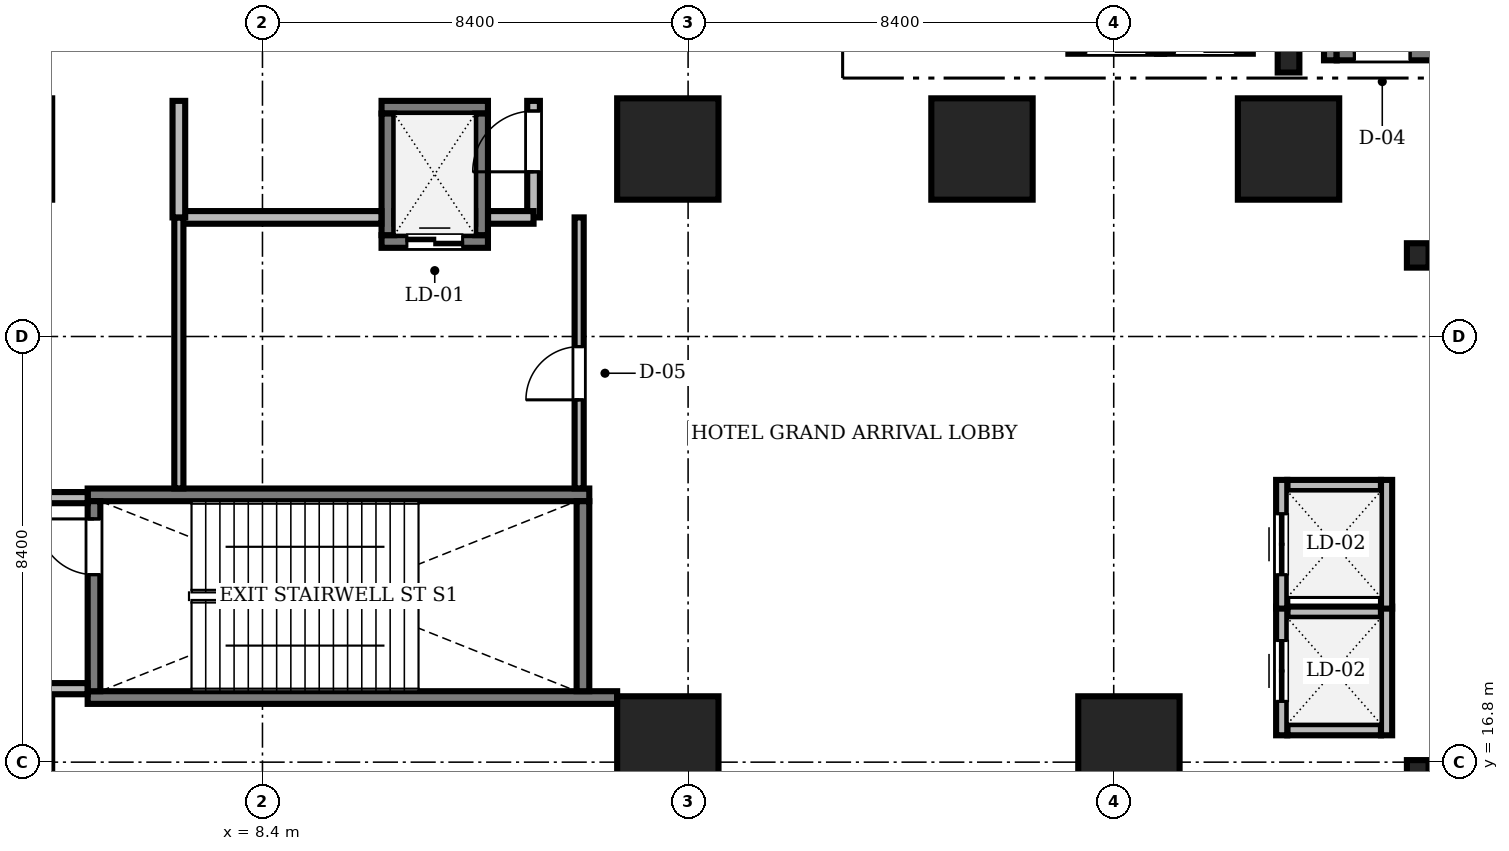
"""IFC4 building model, lengths in metres.
Left out: names, types, materials, properties, quantities, classifications, styles, units other than length and angle.
Written with IfcOpenShell. Run it as: python <this file> out.ifc"""

import sys

from ifc_helpers import new_model, si_unit, direction, frame, frame_2d, origin, origin_2d, place, context, subcontext, project, spatial, rectangle, i_section, extrude, source, transform, mapped, element, fill, save


model = new_model("IFC4")
c1 = context("Model", 3, precision=1e-05, world=origin(), true_north=direction((0.0, 1.0)))
c2 = subcontext(c1, "Body", "Model", "MODEL_VIEW")
j1 = project(units=[si_unit("LENGTHUNIT", "METRE"), si_unit("PLANEANGLEUNIT", "RADIAN")], contexts=[c1])
p1 = place(None, origin())
s1 = spatial("IfcSite", under=j1, at=p1, CompositionType="ELEMENT")
p2 = place(p1, origin())
s2 = spatial("IfcBuilding", under=s1, at=p2, CompositionType="ELEMENT")
p3 = place(p2, origin())
s3 = spatial("IfcBuildingStorey", under=s2, at=p3, CompositionType="ELEMENT", Elevation=0.0)
m1 = source(origin(), c2, "Body", "SweptSolid", [
    extrude(i_section(OverallWidth=0.428, OverallDepth=0.481, WebThickness=0.04, FlangeThickness=0.063, FilletRadius=0.015, at=origin_2d()), origin(), (0.0, 0.0, 1.0), 5.68),
])
for number, where, z_axis, x_axis in (
    (1, (31.2, 16.6, 0.0), (0.0, 0.0, 1.0), (1.0, 0.0, 0.0)),
    (2, (31.2, 26.8, 0.0), (0.0, 0.0, 1.0), (1.0, 0.0, 0.0)),
    (3, (28.65, 30.65, 0.0), (0.0, 0.0, 1.0), (1.0, 0.0, 0.0)),
):
    element("IfcColumn", number, at=place(p3, frame(where, z_axis=z_axis, x_axis=x_axis)), inside=s3, PredefinedType="COLUMN", context=c2, shape_type="MappedRepresentation", body=[
        mapped(m1, transform((0.0, 0.0, 0.0), scale=1.0)),
    ])
m2 = source(origin(), c2, "Body", "SweptSolid", [
    extrude(rectangle(XDim=2.0, YDim=2.0, at=origin_2d()), origin(), (0.0, 0.0, 1.0), 5.68),
])
for number, where, z_axis, x_axis in (
    (4, (16.4, 17.1, 0.0), (0.0, 0.0, 1.0), (1.0, 0.0, 0.0)),
    (5, (25.5, 17.1, 0.0), (0.0, 0.0, 1.0), (1.0, 0.0, 0.0)),
    (6, (16.4, 28.9, 0.0), (0.0, 0.0, 1.0), (1.0, 0.0, 0.0)),
    (7, (22.6, 28.9, 0.0), (0.0, 0.0, 1.0), (1.0, 0.0, 0.0)),
    (8, (28.65, 28.9, 0.0), (0.0, 0.0, 1.0), (1.0, 0.0, 0.0)),
):
    element("IfcColumn", number, at=place(p3, frame(where, z_axis=z_axis, x_axis=x_axis)), inside=s3, PredefinedType="COLUMN", context=c2, shape_type="MappedRepresentation", body=[
        mapped(m2, transform((0.0, 0.0, 0.0), scale=1.0)),
    ])
m3 = source(origin(), c2, "Body", "SweptSolid", [
    extrude(rectangle(XDim=9.05, YDim=0.25, at=frame_2d((4.525, 0.0))), origin(), (0.0, 0.0, 1.0), 5.8),
])
p4 = place(p3, frame((29.475, 30.65, 0.0), z_axis=(0.0, 0.0, 1.0), x_axis=(0.0, 1.0, 0.0)))
e9 = element("IfcWall", 9, at=p4, inside=s3, PredefinedType="SOLIDWALL", context=c2, shape_type="MappedRepresentation", body=[
    mapped(m3, transform((0.0, 0.0, 0.0), scale=1.0)),
])
m4 = source(origin(), c2, "Body", "SweptSolid", [
    extrude(rectangle(XDim=3.15, YDim=0.25, at=frame_2d((1.575, 0.0))), origin(), (0.0, 0.0, 1.0), 5.8),
])
p5 = place(p3, frame((29.6, 30.775, 0.0), z_axis=(0.0, 0.0, 1.0), x_axis=(1.0, 0.0, 0.0)))
e10 = element("IfcWall", 10, at=p5, inside=s3, PredefinedType="SOLIDWALL", context=c2, shape_type="MappedRepresentation", body=[
    mapped(m4, transform((0.0, 0.0, 0.0), scale=1.0)),
])
m5 = source(origin(), c2, "Body", "SweptSolid", [
    extrude(rectangle(XDim=1.1, YDim=2.2, at=frame_2d((0.55, 1.1))), frame((0.0, 0.135, 0.0), z_axis=(0.0, -1.0, 0.0), x_axis=(1.0, 0.0, 0.0)), (0.0, 0.0, 1.0), 0.27),
])
p6 = place(p5, frame((0.35, 0.0, 0.0)))
e11 = element("IfcOpeningElement", 11, at=p6, cuts=e10, PredefinedType="OPENING", context=c2, shape_type="MappedRepresentation", body=[
    mapped(m5, transform((0.0, 0.0, 0.0), scale=1.0)),
])
m6 = source(origin(), c2, "Body", "SweptSolid", [
    extrude(rectangle(XDim=10.45, YDim=0.25, at=frame_2d((5.225, 0.0))), origin(), (0.0, 0.0, 1.0), 5.8),
])
p7 = place(p3, frame((4.95, 18.075, 0.0), z_axis=(0.0, 0.0, 1.0), x_axis=(1.0, 0.0, 0.0)))
e12 = element("IfcWall", 12, at=p7, inside=s3, PredefinedType="SOLIDWALL", context=c2, shape_type="MappedRepresentation", body=[
    mapped(m6, transform((0.0, 0.0, 0.0), scale=1.0)),
])
m7 = source(origin(), c2, "Body", "SweptSolid", [
    extrude(rectangle(XDim=9.9, YDim=0.25, at=frame_2d((4.95, 0.0))), origin(), (0.0, 0.0, 1.0), 5.8),
])
p8 = place(p3, frame((4.95, 22.075, 0.0), z_axis=(0.0, 0.0, 1.0), x_axis=(1.0, 0.0, 0.0)))
e13 = element("IfcWall", 13, at=p8, inside=s3, PredefinedType="SOLIDWALL", context=c2, shape_type="MappedRepresentation", body=[
    mapped(m7, transform((0.0, 0.0, 0.0), scale=1.0)),
])
m8 = source(origin(), c2, "Body", "SweptSolid", [
    extrude(rectangle(XDim=3.75, YDim=0.25, at=frame_2d((1.875, 0.0))), origin(), (0.0, 0.0, 1.0), 5.8),
])
p9 = place(p3, frame((14.725, 18.2, 0.0), z_axis=(0.0, 0.0, 1.0), x_axis=(0.0, 1.0, 0.0)))
e14 = element("IfcWall", 14, at=p9, inside=s3, PredefinedType="SOLIDWALL", context=c2, shape_type="MappedRepresentation", body=[
    mapped(m8, transform((0.0, 0.0, 0.0), scale=1.0)),
])
p10 = place(p3, frame((5.075, 18.2, 0.0), z_axis=(0.0, 0.0, 1.0), x_axis=(0.0, 1.0, 0.0)))
e15 = element("IfcWall", 15, at=p10, inside=s3, PredefinedType="SOLIDWALL", context=c2, shape_type="MappedRepresentation", body=[
    mapped(m8, transform((0.0, 0.0, 0.0), scale=1.0)),
])
p11 = place(p10, frame((2.3, 0.0, 0.0)))
e16 = element("IfcOpeningElement", 16, at=p11, cuts=e15, PredefinedType="OPENING", context=c2, shape_type="MappedRepresentation", body=[
    mapped(m5, transform((0.0, 0.0, 0.0), scale=1.0)),
])
m9 = source(origin(), c2, "Body", "SweptSolid", [
    extrude(rectangle(XDim=2.1, YDim=0.25, at=frame_2d((1.05, 0.0))), origin(), (0.0, 0.0, 1.0), 5.68),
])
p12 = place(p3, frame((10.75, 27.075, 0.0), z_axis=(0.0, 0.0, 1.0), x_axis=(1.0, 0.0, 0.0)))
e17 = element("IfcWall", 17, at=p12, inside=s3, PredefinedType="SOLIDWALL", context=c2, shape_type="MappedRepresentation", body=[
    mapped(m9, transform((0.0, 0.0, 0.0), scale=1.0)),
])
p13 = place(p12, frame((0.5, 0.0, 0.0)))
e18 = element("IfcOpeningElement", 18, at=p13, cuts=e17, PredefinedType="OPENING", context=c2, shape_type="MappedRepresentation", body=[
    mapped(m5, transform((0.0, 0.0, 0.0), scale=1.0)),
])
p14 = place(p3, frame((10.75, 29.725, 0.0), z_axis=(0.0, 0.0, 1.0), x_axis=(1.0, 0.0, 0.0)))
e19 = element("IfcWall", 19, at=p14, inside=s3, PredefinedType="SOLIDWALL", context=c2, shape_type="MappedRepresentation", body=[
    mapped(m9, transform((0.0, 0.0, 0.0), scale=1.0)),
])
m10 = source(origin(), c2, "Body", "SweptSolid", [
    extrude(rectangle(XDim=2.4, YDim=0.25, at=frame_2d((1.2, 0.0))), origin(), (0.0, 0.0, 1.0), 5.68),
])
for number, where, z_axis, x_axis in (
    (20, (10.875, 27.2, 0.0), (0.0, 0.0, 1.0), (0.0, 1.0, 0.0)),
    (21, (12.725, 27.2, 0.0), (0.0, 0.0, 1.0), (0.0, 1.0, 0.0)),
):
    element("IfcWall", number, at=place(p3, frame(where, z_axis=z_axis, x_axis=x_axis)), inside=s3, PredefinedType="SOLIDWALL", context=c2, shape_type="MappedRepresentation", body=[
        mapped(m10, transform((0.0, 0.0, 0.0), scale=1.0)),
    ])
m11 = source(origin(), c2, "Body", "SweptSolid", [
    extrude(rectangle(XDim=1.89, YDim=0.22, at=frame_2d((0.945, 0.0))), origin(), (0.0, 0.0, 1.0), 5.68),
])
p15 = place(p3, frame((24.305, 30.89, 0.0), z_axis=(0.0, 0.0, 1.0), x_axis=(1.0, 0.0, 0.0)))
e22 = element("IfcWall", 22, at=p15, inside=s3, PredefinedType="SOLIDWALL", context=c2, shape_type="MappedRepresentation", body=[
    mapped(m11, transform((0.0, 0.0, 0.0), scale=1.0)),
])
m12 = source(origin(), c2, "Body", "SweptSolid", [
    extrude(rectangle(XDim=1.2, YDim=2.25, at=frame_2d((0.6, 1.125))), frame((0.0, 0.12, 0.0), z_axis=(0.0, -1.0, 0.0), x_axis=(1.0, 0.0, 0.0)), (0.0, 0.0, 1.0), 0.24),
])
p16 = place(p15, frame((0.345, 0.0, 0.0)))
e23 = element("IfcOpeningElement", 23, at=p16, cuts=e22, PredefinedType="OPENING", context=c2, shape_type="MappedRepresentation", body=[
    mapped(m12, transform((0.0, 0.0, 0.0), scale=1.0)),
])
p17 = place(p3, frame((26.055, 30.89, 0.0), z_axis=(0.0, 0.0, 1.0), x_axis=(1.0, 0.0, 0.0)))
e24 = element("IfcWall", 24, at=p17, inside=s3, PredefinedType="SOLIDWALL", context=c2, shape_type="MappedRepresentation", body=[
    mapped(m11, transform((0.0, 0.0, 0.0), scale=1.0)),
])
p18 = place(p17, frame((0.345, 0.0, 0.0)))
e25 = element("IfcOpeningElement", 25, at=p18, cuts=e24, PredefinedType="OPENING", context=c2, shape_type="MappedRepresentation", body=[
    mapped(m12, transform((0.0, 0.0, 0.0), scale=1.0)),
])
m13 = source(origin(), c2, "Body", "SweptSolid", [
    extrude(rectangle(XDim=1.85, YDim=0.22, at=frame_2d((0.925, 0.0))), origin(), (0.0, 0.0, 1.0), 5.68),
])
for number, where, z_axis, x_axis in (
    (26, (28.625, 17.44, 0.0), (0.0, 0.0, 1.0), (1.0, 0.0, 0.0)),
    (27, (28.625, 19.76, 0.0), (0.0, 0.0, 1.0), (1.0, 0.0, 0.0)),
):
    element("IfcWall", number, at=place(p3, frame(where, z_axis=z_axis, x_axis=x_axis)), inside=s3, PredefinedType="SOLIDWALL", context=c2, shape_type="MappedRepresentation", body=[
        mapped(m13, transform((0.0, 0.0, 0.0), scale=1.0)),
    ])
m14 = source(origin(), c2, "Body", "SweptSolid", [
    extrude(rectangle(XDim=2.54, YDim=0.22, at=frame_2d((1.27, 0.0))), origin(), (0.0, 0.0, 1.0), 5.68),
])
p19 = place(p3, frame((28.515, 17.33, 0.0), z_axis=(0.0, 0.0, 1.0), x_axis=(0.0, 1.0, 0.0)))
e28 = element("IfcWall", 28, at=p19, inside=s3, PredefinedType="SOLIDWALL", context=c2, shape_type="MappedRepresentation", body=[
    mapped(m14, transform((0.0, 0.0, 0.0), scale=1.0)),
])
p20 = place(p19, frame((0.67, 0.0, 0.0)))
e29 = element("IfcOpeningElement", 29, at=p20, cuts=e28, PredefinedType="OPENING", context=c2, shape_type="MappedRepresentation", body=[
    mapped(m12, transform((0.0, 0.0, 0.0), scale=1.0)),
])
p21 = place(p3, frame((30.585, 17.33, 0.0), z_axis=(0.0, 0.0, 1.0), x_axis=(0.0, 1.0, 0.0)))
e30 = element("IfcWall", 30, at=p21, inside=s3, PredefinedType="SOLIDWALL", context=c2, shape_type="MappedRepresentation", body=[
    mapped(m14, transform((0.0, 0.0, 0.0), scale=1.0)),
])
p22 = place(p3, frame((28.625, 22.26, 0.0), z_axis=(0.0, 0.0, 1.0), x_axis=(1.0, 0.0, 0.0)))
e31 = element("IfcWall", 31, at=p22, inside=s3, PredefinedType="SOLIDWALL", context=c2, shape_type="MappedRepresentation", body=[
    mapped(m13, transform((0.0, 0.0, 0.0), scale=1.0)),
])
p23 = place(p3, frame((28.515, 19.83, 0.0), z_axis=(0.0, 0.0, 1.0), x_axis=(0.0, 1.0, 0.0)))
e32 = element("IfcWall", 32, at=p23, inside=s3, PredefinedType="SOLIDWALL", context=c2, shape_type="MappedRepresentation", body=[
    mapped(m14, transform((0.0, 0.0, 0.0), scale=1.0)),
])
p24 = place(p23, frame((0.67, 0.0, 0.0)))
e33 = element("IfcOpeningElement", 33, at=p24, cuts=e32, PredefinedType="OPENING", context=c2, shape_type="MappedRepresentation", body=[
    mapped(m12, transform((0.0, 0.0, 0.0), scale=1.0)),
])
p25 = place(p3, frame((30.585, 19.83, 0.0), z_axis=(0.0, 0.0, 1.0), x_axis=(0.0, 1.0, 0.0)))
e34 = element("IfcWall", 34, at=p25, inside=s3, PredefinedType="SOLIDWALL", context=c2, shape_type="MappedRepresentation", body=[
    mapped(m14, transform((0.0, 0.0, 0.0), scale=1.0)),
])
m15 = source(origin(), c2, "Body", "SweptSolid", [
    extrude(rectangle(XDim=5.348, YDim=0.18, at=frame_2d((2.674, 0.0))), origin(), (0.0, 0.0, 1.0), 5.68),
])
p26 = place(p3, frame((14.65, 22.202, 0.0), z_axis=(0.0, 0.0, 1.0), x_axis=(0.0, 1.0, 0.0)))
e35 = element("IfcWall", 35, at=p26, inside=s3, PredefinedType="PARTITIONING", context=c2, shape_type="MappedRepresentation", body=[
    mapped(m15, transform((0.0, 0.0, 0.0), scale=1.0)),
])
m16 = source(origin(), c2, "Body", "SweptSolid", [
    extrude(rectangle(XDim=1.05, YDim=2.2, at=frame_2d((0.525, 1.1))), frame((0.0, 0.1, 0.0), z_axis=(0.0, -1.0, 0.0), x_axis=(1.0, 0.0, 0.0)), (0.0, 0.0, 1.0), 0.2),
])
p27 = place(p26, frame((1.748, 0.0, 0.0)))
e36 = element("IfcOpeningElement", 36, at=p27, cuts=e35, PredefinedType="OPENING", context=c2, shape_type="MappedRepresentation", body=[
    mapped(m16, transform((0.0, 0.0, 0.0), scale=1.0)),
])
m17 = source(origin(), c2, "Body", "SweptSolid", [
    extrude(rectangle(XDim=4.136, YDim=0.22, at=frame_2d((2.068, 0.0))), origin(), (0.0, 0.0, 1.0), 5.072),
])
p28 = place(p3, frame((0.812, 18.25, 0.0), z_axis=(0.0, 0.0, 1.0), x_axis=(1.0, 0.0, 0.0)))
e37 = element("IfcWall", 37, at=p28, inside=s3, PredefinedType="SOLIDWALL", context=c2, shape_type="MappedRepresentation", body=[
    mapped(m17, transform((0.0, 0.0, 0.0), scale=1.0)),
])
m18 = source(origin(), c2, "Body", "SweptSolid", [
    extrude(rectangle(XDim=0.95, YDim=2.15, at=frame_2d((0.475, 1.075))), frame((0.0, 0.12, 0.0), z_axis=(0.0, -1.0, 0.0), x_axis=(1.0, 0.0, 0.0)), (0.0, 0.0, 1.0), 0.24),
])
p29 = place(p28, frame((0.2, 0.0, 0.0)))
e38 = element("IfcOpeningElement", 38, at=p29, cuts=e37, PredefinedType="OPENING", context=c2, shape_type="MappedRepresentation", body=[
    mapped(m18, transform((0.0, 0.0, 0.0), scale=1.0)),
])
m19 = source(origin(), c2, "Body", "SweptSolid", [
    extrude(rectangle(XDim=2.3, YDim=0.25, at=frame_2d((1.15, 0.0))), origin(), (0.0, 0.0, 1.0), 5.68),
])
p30 = place(p3, frame((13.75, 27.55, 0.0), z_axis=(0.0, 0.0, 1.0), x_axis=(0.0, 1.0, 0.0)))
e39 = element("IfcWall", 39, at=p30, inside=s3, PredefinedType="SOLIDWALL", context=c2, shape_type="MappedRepresentation", body=[
    mapped(m19, transform((0.0, 0.0, 0.0), scale=1.0)),
])
m20 = source(origin(), c2, "Body", "SweptSolid", [
    extrude(rectangle(XDim=1.2, YDim=2.2, at=frame_2d((0.6, 1.1))), frame((0.0, 0.135, 0.0), z_axis=(0.0, -1.0, 0.0), x_axis=(1.0, 0.0, 0.0)), (0.0, 0.0, 1.0), 0.27),
])
p31 = place(p30, frame((0.9, 0.0, 0.0)))
e40 = element("IfcOpeningElement", 40, at=p31, cuts=e39, PredefinedType="OPENING", context=c2, shape_type="MappedRepresentation", body=[
    mapped(m20, transform((0.0, 0.0, 0.0), scale=1.0)),
])
m21 = source(origin(), c2, "Body", "SweptSolid", [
    extrude(rectangle(XDim=3.998, YDim=0.25, at=frame_2d((1.999, 0.0))), origin(), (0.0, 0.0, 1.0), 5.68),
])
p32 = place(p3, frame((6.75, 27.55, 0.0), z_axis=(0.0, 0.0, 1.0), x_axis=(1.0, 0.0, 0.0)))
e41 = element("IfcWall", 41, at=p32, inside=s3, PredefinedType="SOLIDWALL", context=c2, shape_type="MappedRepresentation", body=[
    mapped(m21, transform((0.0, 0.0, 0.0), scale=1.0)),
])
m22 = source(origin(), c2, "Body", "SweptSolid", [
    extrude(rectangle(XDim=1.596, YDim=0.25, at=frame_2d((0.798, 0.0))), origin(), (0.0, 0.0, 1.0), 5.68),
])
p33 = place(p3, frame((11.002, 27.55, 0.0), z_axis=(0.0, 0.0, 1.0), x_axis=(1.0, 0.0, 0.0)))
e42 = element("IfcWall", 42, at=p33, inside=s3, PredefinedType="SOLIDWALL", context=c2, shape_type="MappedRepresentation", body=[
    mapped(m22, transform((0.0, 0.0, 0.0), scale=1.0)),
])
m23 = source(origin(), c2, "Body", "SweptSolid", [
    extrude(rectangle(XDim=0.898, YDim=0.25, at=frame_2d((0.449, 0.0))), origin(), (0.0, 0.0, 1.0), 5.68),
])
p34 = place(p3, frame((12.852, 27.55, 0.0), z_axis=(0.0, 0.0, 1.0), x_axis=(1.0, 0.0, 0.0)))
e43 = element("IfcWall", 43, at=p34, inside=s3, PredefinedType="SOLIDWALL", context=c2, shape_type="MappedRepresentation", body=[
    mapped(m23, transform((0.0, 0.0, 0.0), scale=1.0)),
])
p35 = place(p3, frame((6.75, 22.202, 0.0), z_axis=(0.0, 0.0, 1.0), x_axis=(0.0, 1.0, 0.0)))
e44 = element("IfcWall", 44, at=p35, inside=s3, PredefinedType="PARTITIONING", context=c2, shape_type="MappedRepresentation", body=[
    mapped(m15, transform((0.0, 0.0, 0.0), scale=1.0)),
])
m24 = source(origin(), c2, "Body", "SweptSolid", [
    extrude(rectangle(XDim=4.138, YDim=0.22, at=frame_2d((2.069, 0.0))), origin(), (0.0, 0.0, 1.0), 5.072),
])
p36 = place(p3, frame((0.812, 22.02, 0.0), z_axis=(0.0, 0.0, 1.0), x_axis=(1.0, 0.0, 0.0)))
e45 = element("IfcWall", 45, at=p36, inside=s3, PredefinedType="SOLIDWALL", context=c2, shape_type="MappedRepresentation", body=[
    mapped(m24, transform((0.0, 0.0, 0.0), scale=1.0)),
])
p37 = place(p3, frame((6.75, 27.55, 0.0), z_axis=(0.0, 0.0, 1.0), x_axis=(0.0, 1.0, 0.0)))
e46 = element("IfcWall", 46, at=p37, inside=s3, PredefinedType="SOLIDWALL", context=c2, shape_type="MappedRepresentation", body=[
    mapped(m19, transform((0.0, 0.0, 0.0), scale=1.0)),
])
m25 = source(origin(), c2, "Body", "SweptSolid", [
    extrude(rectangle(XDim=1.1, YDim=2.2, at=frame_2d((0.55, 1.1))), frame((0.0, 0.025, 0.0), z_axis=(0.0, -1.0, 0.0), x_axis=(1.0, 0.0, 0.0)), (0.0, 0.0, 1.0), 0.05),
])
p38 = place(p6, origin())
e47 = element("IfcDoor", 47, at=p38, inside=s3, OperationType="SINGLE_SWING_LEFT", PredefinedType="DOOR", context=c2, shape_type="MappedRepresentation", body=[
    mapped(m25, transform((0.0, 0.0, 0.0), scale=1.0)),
])
fill(e11, e47)
p39 = place(p11, origin())
e48 = element("IfcDoor", 48, at=p39, inside=s3, OperationType="SINGLE_SWING_RIGHT", PredefinedType="DOOR", context=c2, shape_type="MappedRepresentation", body=[
    mapped(m25, transform((0.0, 0.0, 0.0), scale=1.0)),
])
fill(e16, e48)
p40 = place(p13, origin())
e49 = element("IfcDoor", 49, at=p40, inside=s3, OperationType="DOUBLE_DOOR_SLIDING", PredefinedType="DOOR", context=c2, shape_type="MappedRepresentation", body=[
    mapped(m25, transform((0.0, 0.0, 0.0), scale=1.0)),
])
fill(e18, e49)
m26 = source(origin(), c2, "Body", "SweptSolid", [
    extrude(rectangle(XDim=1.2, YDim=2.25, at=frame_2d((0.6, 1.125))), frame((0.0, 0.025, 0.0), z_axis=(0.0, -1.0, 0.0), x_axis=(1.0, 0.0, 0.0)), (0.0, 0.0, 1.0), 0.05),
])
p41 = place(p20, origin())
e50 = element("IfcDoor", 50, at=p41, inside=s3, OperationType="DOUBLE_DOOR_SLIDING", PredefinedType="DOOR", context=c2, shape_type="MappedRepresentation", body=[
    mapped(m26, transform((0.0, 0.0, 0.0), scale=1.0)),
])
fill(e29, e50)
p42 = place(p24, origin())
e51 = element("IfcDoor", 51, at=p42, inside=s3, OperationType="DOUBLE_DOOR_SLIDING", PredefinedType="DOOR", context=c2, shape_type="MappedRepresentation", body=[
    mapped(m26, transform((0.0, 0.0, 0.0), scale=1.0)),
])
fill(e33, e51)
m27 = source(origin(), c2, "Body", "SweptSolid", [
    extrude(rectangle(XDim=1.05, YDim=2.2, at=frame_2d((0.525, 1.1))), frame((0.0, 0.025, 0.0), z_axis=(0.0, -1.0, 0.0), x_axis=(1.0, 0.0, 0.0)), (0.0, 0.0, 1.0), 0.05),
])
p43 = place(p27, origin())
e52 = element("IfcDoor", 52, at=p43, inside=s3, OperationType="SINGLE_SWING_LEFT", PredefinedType="DOOR", context=c2, shape_type="MappedRepresentation", body=[
    mapped(m27, transform((0.0, 0.0, 0.0), scale=1.0)),
])
fill(e36, e52)
m28 = source(origin(), c2, "Body", "SweptSolid", [
    extrude(rectangle(XDim=1.2, YDim=2.2, at=frame_2d((0.6, 1.1))), frame((0.0, 0.025, 0.0), z_axis=(0.0, -1.0, 0.0), x_axis=(1.0, 0.0, 0.0)), (0.0, 0.0, 1.0), 0.05),
])
p44 = place(p31, origin())
e53 = element("IfcDoor", 53, at=p44, inside=s3, OperationType="SINGLE_SWING_LEFT", PredefinedType="DOOR", context=c2, shape_type="MappedRepresentation", body=[
    mapped(m28, transform((0.0, 0.0, 0.0), scale=1.0)),
])
fill(e40, e53)
save(model, sys.argv[1])
